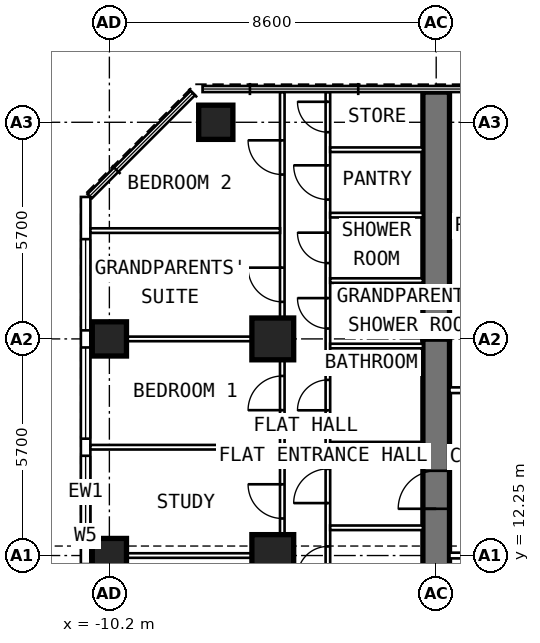
"""IFC4 building model, lengths in metres.
Left out: names, types, materials, properties, quantities, classifications, styles, units other than length and angle.
Written with IfcOpenShell. Run it as: python <this file> out.ifc"""

import sys

from ifc_helpers import new_model, si_unit, direction, frame, frame_2d, origin, origin_2d, place, context, subcontext, project, spatial, rectangle, extrude, element, fill, save


model = new_model("IFC4")
c1 = context("Model", 3, precision=1e-05, world=origin(), true_north=direction((0.0, 1.0)))
c2 = subcontext(c1, "Body", "Model", "MODEL_VIEW")
j1 = project(units=[si_unit("LENGTHUNIT", "METRE"), si_unit("PLANEANGLEUNIT", "RADIAN")], contexts=[c1])
p1 = place(None, origin())
s1 = spatial("IfcSite", under=j1, at=p1, CompositionType="ELEMENT")
p2 = place(p1, origin())
s2 = spatial("IfcBuilding", under=s1, at=p2, CompositionType="ELEMENT")
p3 = place(p2, frame((0.0, 0.0, 193.8)))
s3 = spatial("IfcBuildingStorey", under=s2, at=p3, CompositionType="ELEMENT", Elevation=193.8)
for number, where, z_axis, x_axis in (
    (1, (-10.2, 12.25, 0.0), (0.0, 0.0, 1.0), (0.0, 1.0, 0.0)),
    (2, (-10.2, 17.95, 0.0), (0.0, 0.0, 1.0), (0.0, 1.0, 0.0)),
    (3, (-7.4, 23.65, 0.0), (0.0, 0.0, 1.0), (0.0, 1.0, 0.0)),
):
    element("IfcColumn", number, at=place(p3, frame(where, z_axis=z_axis, x_axis=x_axis)), inside=s3, PredefinedType="COLUMN", context=c2, shape_type="SweptSolid", body=[
        extrude(rectangle(XDim=0.9, YDim=0.9, at=origin_2d()), origin(), (0.0, 0.0, 1.0), 3.6),
    ])
for number, where, z_axis, x_axis in (
    (4, (-5.9, 12.25, 0.0), (0.0, 0.0, 1.0), (0.0, 1.0, 0.0)),
    (5, (-5.9, 17.95, 0.0), (0.0, 0.0, 1.0), (0.0, 1.0, 0.0)),
):
    element("IfcColumn", number, at=place(p3, frame(where, z_axis=z_axis, x_axis=x_axis)), inside=s3, PredefinedType="COLUMN", context=c2, shape_type="SweptSolid", body=[
        extrude(rectangle(XDim=1.1, YDim=1.1, at=origin_2d()), origin(), (0.0, 0.0, 1.0), 3.6),
    ])
p4 = place(p3, frame((-1.6, 9.6, 0.0), z_axis=(0.0, 0.0, 1.0), x_axis=(0.0, 1.0, 0.0)))
e6 = element("IfcWall", 6, at=p4, inside=s3, PredefinedType="SHEAR", context=c2, shape_type="SweptSolid", body=[
    extrude(rectangle(XDim=8.35, YDim=0.7, at=frame_2d((4.175, 0.0))), origin(), (0.0, 0.0, 1.0), 3.6),
])
p5 = place(p4, frame((3.88, 0.0, 0.0)))
e7 = element("IfcOpeningElement", 7, at=p5, cuts=e6, PredefinedType="OPENING", context=c2, shape_type="SweptSolid", body=[
    extrude(rectangle(XDim=1.0, YDim=2.1, at=frame_2d((0.5, 1.05))), frame((0.0, 0.362, 0.0), z_axis=(0.0, -1.0, 0.0), x_axis=(1.0, 0.0, 0.0)), (0.0, 0.0, 1.0), 0.724),
])
p6 = place(p3, frame((-1.6, 17.95, 0.0), z_axis=(0.0, 0.0, 1.0), x_axis=(0.0, 1.0, 0.0)))
e8 = element("IfcWall", 8, at=p6, inside=s3, PredefinedType="SHEAR", context=c2, shape_type="SweptSolid", body=[
    extrude(rectangle(XDim=6.495, YDim=0.7, at=frame_2d((3.248, 0.0))), origin(), (0.0, 0.0, 1.0), 3.6),
])
p7 = place(p3, frame((-10.825, 6.148, 0.0), z_axis=(0.0, 0.0, 1.0), x_axis=(0.0, 1.0, 0.0)))
e9 = element("IfcWall", 9, at=p7, inside=s3, PredefinedType="SOLIDWALL", context=c2, shape_type="SweptSolid", body=[
    extrude(rectangle(XDim=15.537, YDim=0.25, at=frame_2d((7.769, 0.0))), origin(), (0.0, 0.0, 1.0), 3.35),
])
p8 = place(p7, frame((0.627, 0.0, 0.8)))
e10 = element("IfcOpeningElement", 10, at=p8, cuts=e9, PredefinedType="OPENING", context=c2, shape_type="SweptSolid", body=[
    extrude(rectangle(XDim=2.4, YDim=1.8, at=frame_2d((1.2, 0.9))), frame((0.0, 0.137, 0.0), z_axis=(0.0, -1.0, 0.0), x_axis=(1.0, 0.0, 0.0)), (0.0, 0.0, 1.0), 0.274),
])
p9 = place(p7, frame((3.477, 0.0, 0.8)))
e11 = element("IfcOpeningElement", 11, at=p9, cuts=e9, PredefinedType="OPENING", context=c2, shape_type="SweptSolid", body=[
    extrude(rectangle(XDim=2.4, YDim=1.8, at=frame_2d((1.2, 0.9))), frame((0.0, 0.137, 0.0), z_axis=(0.0, -1.0, 0.0), x_axis=(1.0, 0.0, 0.0)), (0.0, 0.0, 1.0), 0.274),
])
p10 = place(p7, frame((6.327, 0.0, 0.8)))
e12 = element("IfcOpeningElement", 12, at=p10, cuts=e9, PredefinedType="OPENING", context=c2, shape_type="SweptSolid", body=[
    extrude(rectangle(XDim=2.4, YDim=1.8, at=frame_2d((1.2, 0.9))), frame((0.0, 0.137, 0.0), z_axis=(0.0, -1.0, 0.0), x_axis=(1.0, 0.0, 0.0)), (0.0, 0.0, 1.0), 0.274),
])
p11 = place(p7, frame((9.177, 0.0, 0.8)))
e13 = element("IfcOpeningElement", 13, at=p11, cuts=e9, PredefinedType="OPENING", context=c2, shape_type="SweptSolid", body=[
    extrude(rectangle(XDim=2.4, YDim=1.8, at=frame_2d((1.2, 0.9))), frame((0.0, 0.137, 0.0), z_axis=(0.0, -1.0, 0.0), x_axis=(1.0, 0.0, 0.0)), (0.0, 0.0, 1.0), 0.274),
])
p12 = place(p7, frame((12.027, 0.0, 0.8)))
e14 = element("IfcOpeningElement", 14, at=p12, cuts=e9, PredefinedType="OPENING", context=c2, shape_type="SweptSolid", body=[
    extrude(rectangle(XDim=2.4, YDim=1.8, at=frame_2d((1.2, 0.9))), frame((0.0, 0.137, 0.0), z_axis=(0.0, -1.0, 0.0), x_axis=(1.0, 0.0, 0.0)), (0.0, 0.0, 1.0), 0.274),
])
p13 = place(p3, frame((-4.45, 9.925, 0.0), z_axis=(0.0, 0.0, 1.0), x_axis=(0.0, 1.0, 0.0)))
e15 = element("IfcWall", 15, at=p13, inside=s3, PredefinedType="PARTITIONING", context=c2, shape_type="SweptSolid", body=[
    extrude(rectangle(XDim=14.52, YDim=0.12, at=frame_2d((7.26, 0.0))), origin(), (0.0, 0.0, 1.0), 3.35),
])
p14 = place(p13, frame((1.765, 0.0, 0.0)))
e16 = element("IfcOpeningElement", 16, at=p14, cuts=e15, PredefinedType="OPENING", context=c2, shape_type="SweptSolid", body=[
    extrude(rectangle(XDim=0.8, YDim=2.1, at=frame_2d((0.4, 1.05))), frame((0.0, 0.072, 0.0), z_axis=(0.0, -1.0, 0.0), x_axis=(1.0, 0.0, 0.0)), (0.0, 0.0, 1.0), 0.144),
])
p15 = place(p13, frame((3.705, 0.0, 0.0)))
e17 = element("IfcOpeningElement", 17, at=p15, cuts=e15, PredefinedType="OPENING", context=c2, shape_type="SweptSolid", body=[
    extrude(rectangle(XDim=0.9, YDim=2.1, at=frame_2d((0.45, 1.05))), frame((0.0, 0.072, 0.0), z_axis=(0.0, -1.0, 0.0), x_axis=(1.0, 0.0, 0.0)), (0.0, 0.0, 1.0), 0.144),
])
p16 = place(p13, frame((6.146, 0.0, 0.0)))
e18 = element("IfcOpeningElement", 18, at=p16, cuts=e15, PredefinedType="OPENING", context=c2, shape_type="SweptSolid", body=[
    extrude(rectangle(XDim=0.8, YDim=2.1, at=frame_2d((0.4, 1.05))), frame((0.0, 0.072, 0.0), z_axis=(0.0, -1.0, 0.0), x_axis=(1.0, 0.0, 0.0)), (0.0, 0.0, 1.0), 0.144),
])
p17 = place(p13, frame((8.299, 0.0, 0.0)))
e19 = element("IfcOpeningElement", 19, at=p17, cuts=e15, PredefinedType="OPENING", context=c2, shape_type="SweptSolid", body=[
    extrude(rectangle(XDim=0.8, YDim=2.1, at=frame_2d((0.4, 1.05))), frame((0.0, 0.072, 0.0), z_axis=(0.0, -1.0, 0.0), x_axis=(1.0, 0.0, 0.0)), (0.0, 0.0, 1.0), 0.144),
])
p18 = place(p13, frame((10.021, 0.0, 0.0)))
e20 = element("IfcOpeningElement", 20, at=p18, cuts=e15, PredefinedType="OPENING", context=c2, shape_type="SweptSolid", body=[
    extrude(rectangle(XDim=0.8, YDim=2.1, at=frame_2d((0.4, 1.05))), frame((0.0, 0.072, 0.0), z_axis=(0.0, -1.0, 0.0), x_axis=(1.0, 0.0, 0.0)), (0.0, 0.0, 1.0), 0.144),
])
p19 = place(p13, frame((11.692, 0.0, 0.0)))
e21 = element("IfcOpeningElement", 21, at=p19, cuts=e15, PredefinedType="OPENING", context=c2, shape_type="SweptSolid", body=[
    extrude(rectangle(XDim=0.9, YDim=2.1, at=frame_2d((0.45, 1.05))), frame((0.0, 0.072, 0.0), z_axis=(0.0, -1.0, 0.0), x_axis=(1.0, 0.0, 0.0)), (0.0, 0.0, 1.0), 0.144),
])
p20 = place(p13, frame((13.464, 0.0, 0.0)))
e22 = element("IfcOpeningElement", 22, at=p20, cuts=e15, PredefinedType="OPENING", context=c2, shape_type="SweptSolid", body=[
    extrude(rectangle(XDim=0.8, YDim=2.1, at=frame_2d((0.4, 1.05))), frame((0.0, 0.072, 0.0), z_axis=(0.0, -1.0, 0.0), x_axis=(1.0, 0.0, 0.0)), (0.0, 0.0, 1.0), 0.144),
])
p21 = place(p3, frame((-5.65, 9.6, 0.0), z_axis=(0.0, 0.0, 1.0), x_axis=(0.0, 1.0, 0.0)))
e23 = element("IfcWall", 23, at=p21, inside=s3, PredefinedType="PARTITIONING", context=c2, shape_type="SweptSolid", body=[
    extrude(rectangle(XDim=14.845, YDim=0.12, at=frame_2d((7.422, 0.0))), origin(), (0.0, 0.0, 1.0), 3.35),
])
p22 = place(p21, frame((1.05, 0.0, 0.0)))
e24 = element("IfcOpeningElement", 24, at=p22, cuts=e23, PredefinedType="OPENING", context=c2, shape_type="SweptSolid", body=[
    extrude(rectangle(XDim=0.9, YDim=2.1, at=frame_2d((0.45, 1.05))), frame((0.0, 0.072, 0.0), z_axis=(0.0, -1.0, 0.0), x_axis=(1.0, 0.0, 0.0)), (0.0, 0.0, 1.0), 0.144),
])
p23 = place(p21, frame((3.625, 0.0, 0.0)))
e25 = element("IfcOpeningElement", 25, at=p23, cuts=e23, PredefinedType="OPENING", context=c2, shape_type="SweptSolid", body=[
    extrude(rectangle(XDim=0.9, YDim=2.1, at=frame_2d((0.45, 1.05))), frame((0.0, 0.072, 0.0), z_axis=(0.0, -1.0, 0.0), x_axis=(1.0, 0.0, 0.0)), (0.0, 0.0, 1.0), 0.144),
])
p24 = place(p21, frame((6.475, 0.0, 0.0)))
e26 = element("IfcOpeningElement", 26, at=p24, cuts=e23, PredefinedType="OPENING", context=c2, shape_type="SweptSolid", body=[
    extrude(rectangle(XDim=0.9, YDim=2.1, at=frame_2d((0.45, 1.05))), frame((0.0, 0.072, 0.0), z_axis=(0.0, -1.0, 0.0), x_axis=(1.0, 0.0, 0.0)), (0.0, 0.0, 1.0), 0.144),
])
p25 = place(p21, frame((9.325, 0.0, 0.0)))
e27 = element("IfcOpeningElement", 27, at=p25, cuts=e23, PredefinedType="OPENING", context=c2, shape_type="SweptSolid", body=[
    extrude(rectangle(XDim=0.9, YDim=2.1, at=frame_2d((0.45, 1.05))), frame((0.0, 0.072, 0.0), z_axis=(0.0, -1.0, 0.0), x_axis=(1.0, 0.0, 0.0)), (0.0, 0.0, 1.0), 0.144),
])
p26 = place(p21, frame((12.675, 0.0, 0.0)))
e28 = element("IfcOpeningElement", 28, at=p26, cuts=e23, PredefinedType="OPENING", context=c2, shape_type="SweptSolid", body=[
    extrude(rectangle(XDim=0.9, YDim=2.1, at=frame_2d((0.45, 1.05))), frame((0.0, 0.072, 0.0), z_axis=(0.0, -1.0, 0.0), x_axis=(1.0, 0.0, 0.0)), (0.0, 0.0, 1.0), 0.144),
])
p27 = place(p3, frame((-5.71, 12.25, 0.0), z_axis=(0.0, 0.0, 1.0), x_axis=(-1.0, 0.0, 0.0)))
e29 = element("IfcWall", 29, at=p27, inside=s3, PredefinedType="PARTITIONING", context=c2, shape_type="SweptSolid", body=[
    extrude(rectangle(XDim=4.99, YDim=0.12, at=frame_2d((2.495, 0.0))), origin(), (0.0, 0.0, 1.0), 2.45),
])
p28 = place(p3, frame((-5.71, 15.1, 0.0), z_axis=(0.0, 0.0, 1.0), x_axis=(-1.0, 0.0, 0.0)))
e30 = element("IfcWall", 30, at=p28, inside=s3, PredefinedType="PARTITIONING", context=c2, shape_type="SweptSolid", body=[
    extrude(rectangle(XDim=4.99, YDim=0.12, at=frame_2d((2.495, 0.0))), origin(), (0.0, 0.0, 1.0), 3.35),
])
p29 = place(p3, frame((-5.71, 17.95, 0.0), z_axis=(0.0, 0.0, 1.0), x_axis=(-1.0, 0.0, 0.0)))
e31 = element("IfcWall", 31, at=p29, inside=s3, PredefinedType="PARTITIONING", context=c2, shape_type="SweptSolid", body=[
    extrude(rectangle(XDim=4.99, YDim=0.12, at=frame_2d((2.495, 0.0))), origin(), (0.0, 0.0, 1.0), 2.45),
])
p30 = place(p3, frame((-5.71, 20.8, 0.0), z_axis=(0.0, 0.0, 1.0), x_axis=(-1.0, 0.0, 0.0)))
e32 = element("IfcWall", 32, at=p30, inside=s3, PredefinedType="PARTITIONING", context=c2, shape_type="SweptSolid", body=[
    extrude(rectangle(XDim=4.99, YDim=0.12, at=frame_2d((2.495, 0.0))), origin(), (0.0, 0.0, 1.0), 3.35),
])
for number, where, z_axis, x_axis in (
    (33, (-1.95, 12.98, 0.0), (0.0, 0.0, 1.0), (-1.0, 0.0, 0.0)),
    (34, (-1.95, 15.18, 0.0), (0.0, 0.0, 1.0), (-1.0, 0.0, 0.0)),
):
    element("IfcWall", number, at=place(p3, frame(where, z_axis=z_axis, x_axis=x_axis)), inside=s3, PredefinedType="PARTITIONING", context=c2, shape_type="SweptSolid", body=[
        extrude(rectangle(XDim=2.44, YDim=0.12, at=frame_2d((1.22, 0.0))), origin(), (0.0, 0.0, 1.0), 3.35),
    ])
p31 = place(p3, frame((-1.95, 17.763, 0.0), z_axis=(0.0, 0.0, 1.0), x_axis=(-1.0, 0.0, 0.0)))
e35 = element("IfcWall", 35, at=p31, inside=s3, PredefinedType="PARTITIONING", context=c2, shape_type="SweptSolid", body=[
    extrude(rectangle(XDim=2.44, YDim=0.12, at=frame_2d((1.22, 0.0))), origin(), (0.0, 0.0, 1.0), 2.45),
])
for number, where, z_axis, x_axis in (
    (36, (-1.95, 19.485, 0.0), (0.0, 0.0, 1.0), (-1.0, 0.0, 0.0)),
    (37, (-1.95, 21.206, 0.0), (0.0, 0.0, 1.0), (-1.0, 0.0, 0.0)),
    (38, (-1.95, 22.928, 0.0), (0.0, 0.0, 1.0), (-1.0, 0.0, 0.0)),
):
    element("IfcWall", number, at=place(p3, frame(where, z_axis=z_axis, x_axis=x_axis)), inside=s3, PredefinedType="PARTITIONING", context=c2, shape_type="SweptSolid", body=[
        extrude(rectangle(XDim=2.44, YDim=0.12, at=frame_2d((1.22, 0.0))), origin(), (0.0, 0.0, 1.0), 3.35),
    ])
p32 = place(p3, frame((1.25, 16.6, 0.0), z_axis=(0.0, 0.0, 1.0), x_axis=(-1.0, 0.0, 0.0)))
e39 = element("IfcWall", 39, at=p32, inside=s3, PredefinedType="PARTITIONING", context=c2, shape_type="SweptSolid", body=[
    extrude(rectangle(XDim=2.5, YDim=0.15, at=frame_2d((1.25, 0.0))), origin(), (0.0, 0.0, 1.0), 3.35),
])
p33 = place(p32, frame((0.75, 0.0, 0.0)))
e40 = element("IfcOpeningElement", 40, at=p33, cuts=e39, PredefinedType="OPENING", context=c2, shape_type="SweptSolid", body=[
    extrude(rectangle(XDim=1.0, YDim=2.1, at=frame_2d((0.5, 1.05))), frame((0.0, 0.087, 0.0), z_axis=(0.0, -1.0, 0.0), x_axis=(1.0, 0.0, 0.0)), (0.0, 0.0, 1.0), 0.174),
])
p34 = place(p3, frame((1.25, 12.25, 0.0), z_axis=(0.0, 0.0, 1.0), x_axis=(-1.0, 0.0, 0.0)))
e41 = element("IfcWall", 41, at=p34, inside=s3, PredefinedType="PARTITIONING", context=c2, shape_type="SweptSolid", body=[
    extrude(rectangle(XDim=2.5, YDim=0.15, at=frame_2d((1.25, 0.0))), origin(), (0.0, 0.0, 1.0), 3.35),
])
p35 = place(p34, frame((0.75, 0.0, 0.0)))
e42 = element("IfcOpeningElement", 42, at=p35, cuts=e41, PredefinedType="OPENING", context=c2, shape_type="SweptSolid", body=[
    extrude(rectangle(XDim=1.0, YDim=2.1, at=frame_2d((0.5, 1.05))), frame((0.0, 0.087, 0.0), z_axis=(0.0, -1.0, 0.0), x_axis=(1.0, 0.0, 0.0)), (0.0, 0.0, 1.0), 0.174),
])
p36 = place(p10, origin())
e43 = element("IfcWindow", 43, at=p36, inside=s3, PartitioningType="SINGLE_PANEL", PredefinedType="WINDOW", context=c2, shape_type="SweptSolid", body=[
    extrude(rectangle(XDim=2.4, YDim=1.8, at=frame_2d((1.2, 0.9))), frame((0.0, 0.03, 0.0), z_axis=(0.0, -1.0, 0.0), x_axis=(1.0, 0.0, 0.0)), (0.0, 0.0, 1.0), 0.06),
])
fill(e12, e43)
p37 = place(p11, origin())
e44 = element("IfcWindow", 44, at=p37, inside=s3, PartitioningType="SINGLE_PANEL", PredefinedType="WINDOW", context=c2, shape_type="SweptSolid", body=[
    extrude(rectangle(XDim=2.4, YDim=1.8, at=frame_2d((1.2, 0.9))), frame((0.0, 0.03, 0.0), z_axis=(0.0, -1.0, 0.0), x_axis=(1.0, 0.0, 0.0)), (0.0, 0.0, 1.0), 0.06),
])
fill(e13, e44)
p38 = place(p12, origin())
e45 = element("IfcWindow", 45, at=p38, inside=s3, PartitioningType="SINGLE_PANEL", PredefinedType="WINDOW", context=c2, shape_type="SweptSolid", body=[
    extrude(rectangle(XDim=2.4, YDim=1.8, at=frame_2d((1.2, 0.9))), frame((0.0, 0.03, 0.0), z_axis=(0.0, -1.0, 0.0), x_axis=(1.0, 0.0, 0.0)), (0.0, 0.0, 1.0), 0.06),
])
fill(e14, e45)
p39 = place(p5, origin())
e46 = element("IfcDoor", 46, at=p39, inside=s3, OperationType="SINGLE_SWING_LEFT", PredefinedType="DOOR", context=c2, shape_type="SweptSolid", body=[
    extrude(rectangle(XDim=1.0, YDim=2.1, at=frame_2d((0.5, 1.05))), frame((0.0, 0.1, 0.0), z_axis=(0.0, -1.0, 0.0), x_axis=(1.0, 0.0, 0.0)), (0.0, 0.0, 1.0), 0.2),
])
fill(e7, e46)
p40 = place(p23, origin())
e47 = element("IfcDoor", 47, at=p40, inside=s3, OperationType="SINGLE_SWING_RIGHT", PredefinedType="DOOR", context=c2, shape_type="SweptSolid", body=[
    extrude(rectangle(XDim=0.9, YDim=2.1, at=frame_2d((0.45, 1.05))), frame((0.0, 0.025, 0.0), z_axis=(0.0, -1.0, 0.0), x_axis=(1.0, 0.0, 0.0)), (0.0, 0.0, 1.0), 0.05),
])
fill(e25, e47)
p41 = place(p24, origin())
e48 = element("IfcDoor", 48, at=p41, inside=s3, OperationType="SINGLE_SWING_LEFT", PredefinedType="DOOR", context=c2, shape_type="SweptSolid", body=[
    extrude(rectangle(XDim=0.9, YDim=2.1, at=frame_2d((0.45, 1.05))), frame((0.0, 0.025, 0.0), z_axis=(0.0, -1.0, 0.0), x_axis=(1.0, 0.0, 0.0)), (0.0, 0.0, 1.0), 0.05),
])
fill(e26, e48)
p42 = place(p25, origin())
e49 = element("IfcDoor", 49, at=p42, inside=s3, OperationType="SINGLE_SWING_RIGHT", PredefinedType="DOOR", context=c2, shape_type="SweptSolid", body=[
    extrude(rectangle(XDim=0.9, YDim=2.1, at=frame_2d((0.45, 1.05))), frame((0.0, 0.025, 0.0), z_axis=(0.0, -1.0, 0.0), x_axis=(1.0, 0.0, 0.0)), (0.0, 0.0, 1.0), 0.05),
])
fill(e27, e49)
p43 = place(p26, origin())
e50 = element("IfcDoor", 50, at=p43, inside=s3, OperationType="SINGLE_SWING_RIGHT", PredefinedType="DOOR", context=c2, shape_type="SweptSolid", body=[
    extrude(rectangle(XDim=0.9, YDim=2.1, at=frame_2d((0.45, 1.05))), frame((0.0, 0.025, 0.0), z_axis=(0.0, -1.0, 0.0), x_axis=(1.0, 0.0, 0.0)), (0.0, 0.0, 1.0), 0.05),
])
fill(e28, e50)
p44 = place(p14, origin())
e51 = element("IfcDoor", 51, at=p44, inside=s3, OperationType="SINGLE_SWING_LEFT", PredefinedType="DOOR", context=c2, shape_type="SweptSolid", body=[
    extrude(rectangle(XDim=0.8, YDim=2.1, at=frame_2d((0.4, 1.05))), frame((0.0, 0.025, 0.0), z_axis=(0.0, -1.0, 0.0), x_axis=(1.0, 0.0, 0.0)), (0.0, 0.0, 1.0), 0.05),
])
fill(e16, e51)
p45 = place(p15, origin())
e52 = element("IfcDoor", 52, at=p45, inside=s3, OperationType="SINGLE_SWING_LEFT", PredefinedType="DOOR", context=c2, shape_type="SweptSolid", body=[
    extrude(rectangle(XDim=0.9, YDim=2.1, at=frame_2d((0.45, 1.05))), frame((0.0, 0.025, 0.0), z_axis=(0.0, -1.0, 0.0), x_axis=(1.0, 0.0, 0.0)), (0.0, 0.0, 1.0), 0.05),
])
fill(e17, e52)
p46 = place(p16, origin())
e53 = element("IfcDoor", 53, at=p46, inside=s3, OperationType="SINGLE_SWING_LEFT", PredefinedType="DOOR", context=c2, shape_type="SweptSolid", body=[
    extrude(rectangle(XDim=0.8, YDim=2.1, at=frame_2d((0.4, 1.05))), frame((0.0, 0.025, 0.0), z_axis=(0.0, -1.0, 0.0), x_axis=(1.0, 0.0, 0.0)), (0.0, 0.0, 1.0), 0.05),
])
fill(e18, e53)
p47 = place(p17, origin())
e54 = element("IfcDoor", 54, at=p47, inside=s3, OperationType="SINGLE_SWING_RIGHT", PredefinedType="DOOR", context=c2, shape_type="SweptSolid", body=[
    extrude(rectangle(XDim=0.8, YDim=2.1, at=frame_2d((0.4, 1.05))), frame((0.0, 0.025, 0.0), z_axis=(0.0, -1.0, 0.0), x_axis=(1.0, 0.0, 0.0)), (0.0, 0.0, 1.0), 0.05),
])
fill(e19, e54)
p48 = place(p18, origin())
e55 = element("IfcDoor", 55, at=p48, inside=s3, OperationType="SINGLE_SWING_RIGHT", PredefinedType="DOOR", context=c2, shape_type="SweptSolid", body=[
    extrude(rectangle(XDim=0.8, YDim=2.1, at=frame_2d((0.4, 1.05))), frame((0.0, 0.025, 0.0), z_axis=(0.0, -1.0, 0.0), x_axis=(1.0, 0.0, 0.0)), (0.0, 0.0, 1.0), 0.05),
])
fill(e20, e55)
p49 = place(p19, origin())
e56 = element("IfcDoor", 56, at=p49, inside=s3, OperationType="SINGLE_SWING_RIGHT", PredefinedType="DOOR", context=c2, shape_type="SweptSolid", body=[
    extrude(rectangle(XDim=0.9, YDim=2.1, at=frame_2d((0.45, 1.05))), frame((0.0, 0.025, 0.0), z_axis=(0.0, -1.0, 0.0), x_axis=(1.0, 0.0, 0.0)), (0.0, 0.0, 1.0), 0.05),
])
fill(e21, e56)
p50 = place(p20, origin())
e57 = element("IfcDoor", 57, at=p50, inside=s3, OperationType="SINGLE_SWING_RIGHT", PredefinedType="DOOR", context=c2, shape_type="SweptSolid", body=[
    extrude(rectangle(XDim=0.8, YDim=2.1, at=frame_2d((0.4, 1.05))), frame((0.0, 0.025, 0.0), z_axis=(0.0, -1.0, 0.0), x_axis=(1.0, 0.0, 0.0)), (0.0, 0.0, 1.0), 0.05),
])
fill(e22, e57)
save(model, sys.argv[1])
